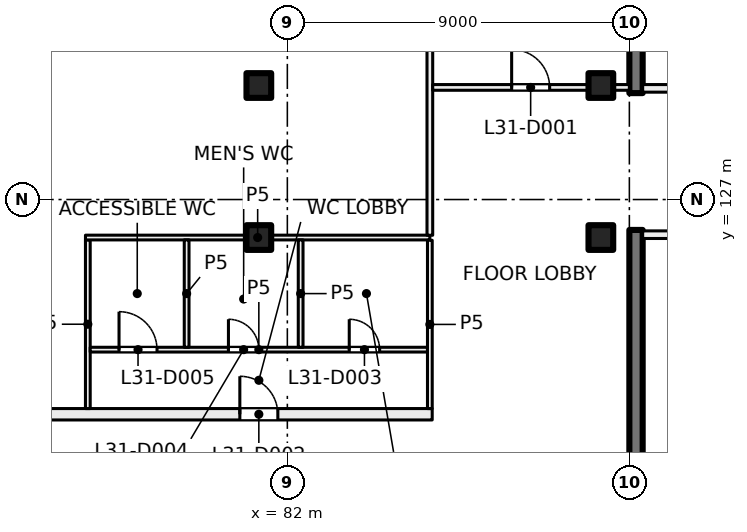
"""IFC4 building model, lengths in metres.
Left out: names, types, materials, properties, quantities, classifications, styles, units other than length and angle.
Written with IfcOpenShell. Run it as: python <this file> out.ifc"""

import sys

from ifc_helpers import new_model, si_unit, direction, frame, frame_2d, origin, origin_2d, place, context, subcontext, project, spatial, rectangle, extrude, element, fill, save


model = new_model("IFC4")
c1 = context("Model", 3, precision=1e-05, world=origin(), true_north=direction((0.0, 1.0)))
c2 = subcontext(c1, "Body", "Model", "MODEL_VIEW")
j1 = project(units=[si_unit("LENGTHUNIT", "METRE"), si_unit("PLANEANGLEUNIT", "RADIAN")], contexts=[c1])
p1 = place(None, origin())
s1 = spatial("IfcSite", under=j1, at=p1, CompositionType="ELEMENT")
p2 = place(p1, origin())
s2 = spatial("IfcBuilding", under=s1, at=p2, CompositionType="ELEMENT")
p3 = place(p2, frame((0.0, 0.0, 134.5)))
s3 = spatial("IfcBuildingStorey", under=s2, at=p3, CompositionType="ELEMENT", Elevation=134.5)
for number, where, z_axis, x_axis in (
    (1, (81.25, 130.0, 0.0), (0.0, 0.0, 1.0), (1.0, 0.0, 0.0)),
    (2, (90.25, 130.0, 0.0), (0.0, 0.0, 1.0), (1.0, 0.0, 0.0)),
    (3, (81.25, 126.0, 0.0), (0.0, 0.0, 1.0), (1.0, 0.0, 0.0)),
    (4, (90.25, 126.0, 0.0), (0.0, 0.0, 1.0), (1.0, 0.0, 0.0)),
):
    element("IfcColumn", number, at=place(p3, frame(where, z_axis=z_axis, x_axis=x_axis)), inside=s3, PredefinedType="COLUMN", context=c2, shape_type="SweptSolid", body=[
        extrude(rectangle(XDim=0.65, YDim=0.65, at=origin_2d()), origin(), (0.0, 0.0, 1.0), 4.0),
    ])
for number, where, z_axis, x_axis in (
    (5, (91.175, 138.45, 0.0), (0.0, 0.0, 1.0), (0.0, -1.0, 0.0)),
    (6, (91.175, 126.2, 0.0), (0.0, 0.0, 1.0), (0.0, -1.0, 0.0)),
):
    element("IfcWall", number, at=place(p3, frame(where, z_axis=z_axis, x_axis=x_axis)), inside=s3, PredefinedType="SHEAR", context=c2, shape_type="SweptSolid", body=[
        extrude(rectangle(XDim=8.65, YDim=0.35, at=frame_2d((4.325, 0.0))), origin(), (0.0, 0.0, 1.0), 4.0),
    ])
p4 = place(p3, frame((95.225, 126.075, 0.0), z_axis=(0.0, 0.0, 1.0), x_axis=(-1.0, 0.0, 0.0)))
e7 = element("IfcWall", 7, at=p4, inside=s3, PredefinedType="PARTITIONING", context=c2, shape_type="SweptSolid", body=[
    extrude(rectangle(XDim=3.875, YDim=0.2, at=frame_2d((1.938, 0.0))), origin(), (0.0, 0.0, 1.0), 3.625),
])
p5 = place(p4, frame((0.3, 0.0, 0.0)))
e8 = element("IfcOpeningElement", 8, at=p5, cuts=e7, PredefinedType="OPENING", context=c2, shape_type="SweptSolid", body=[
    extrude(rectangle(XDim=1.2, YDim=2.1, at=frame_2d((0.6, 1.05))), frame((0.0, 0.11, 0.0), z_axis=(0.0, -1.0, 0.0), x_axis=(1.0, 0.0, 0.0)), (0.0, 0.0, 1.0), 0.22),
])
p6 = place(p3, frame((91.35, 129.925, 0.0), z_axis=(0.0, 0.0, 1.0), x_axis=(1.0, 0.0, 0.0)))
e9 = element("IfcWall", 9, at=p6, inside=s3, PredefinedType="PARTITIONING", context=c2, shape_type="SweptSolid", body=[
    extrude(rectangle(XDim=3.875, YDim=0.2, at=frame_2d((1.938, 0.0))), origin(), (0.0, 0.0, 1.0), 3.625),
])
p7 = place(p6, frame((2.375, 0.0, 0.0)))
e10 = element("IfcOpeningElement", 10, at=p7, cuts=e9, PredefinedType="OPENING", context=c2, shape_type="SweptSolid", body=[
    extrude(rectangle(XDim=1.2, YDim=2.1, at=frame_2d((0.6, 1.05))), frame((0.0, 0.11, 0.0), z_axis=(0.0, -1.0, 0.0), x_axis=(1.0, 0.0, 0.0)), (0.0, 0.0, 1.0), 0.22),
])
p8 = place(p3, frame((50.506, 121.35, 0.0), z_axis=(0.0, 0.0, 1.0), x_axis=(1.0, 0.0, 0.0)))
e11 = element("IfcWall", 11, at=p8, inside=s3, PredefinedType="PARTITIONING", context=c2, shape_type="SweptSolid", body=[
    extrude(rectangle(XDim=35.306, YDim=0.3, at=frame_2d((17.653, 0.0))), origin(), (0.0, 0.0, 1.0), 3.625),
])
p9 = place(p8, frame((30.244, 0.0, 0.0)))
e12 = element("IfcOpeningElement", 12, at=p9, cuts=e11, PredefinedType="OPENING", context=c2, shape_type="SweptSolid", body=[
    extrude(rectangle(XDim=1.0, YDim=2.1, at=frame_2d((0.5, 1.05))), frame((0.0, 0.16, 0.0), z_axis=(0.0, -1.0, 0.0), x_axis=(1.0, 0.0, 0.0)), (0.0, 0.0, 1.0), 0.32),
])
p10 = place(p8, frame((14.094, 0.0, 0.0)))
e13 = element("IfcOpeningElement", 13, at=p10, cuts=e11, PredefinedType="OPENING", context=c2, shape_type="SweptSolid", body=[
    extrude(rectangle(XDim=1.8, YDim=2.1, at=frame_2d((0.9, 1.05))), frame((0.0, 0.16, 0.0), z_axis=(0.0, -1.0, 0.0), x_axis=(1.0, 0.0, 0.0)), (0.0, 0.0, 1.0), 0.32),
])
p11 = place(p8, frame((1.047, 0.0, 0.0)))
e14 = element("IfcOpeningElement", 14, at=p11, cuts=e11, PredefinedType="OPENING", context=c2, shape_type="SweptSolid", body=[
    extrude(rectangle(XDim=1.8, YDim=2.1, at=frame_2d((0.9, 1.05))), frame((0.0, 0.16, 0.0), z_axis=(0.0, -1.0, 0.0), x_axis=(1.0, 0.0, 0.0)), (0.0, 0.0, 1.0), 0.32),
])
p12 = place(p3, frame((76.75, 121.5, 0.0), z_axis=(0.0, 0.0, 1.0), x_axis=(0.0, 1.0, 0.0)))
e15 = element("IfcWall", 15, at=p12, inside=s3, PredefinedType="PARTITIONING", context=c2, shape_type="SweptSolid", body=[
    extrude(rectangle(XDim=4.438, YDim=0.125, at=frame_2d((2.219, 0.0))), origin(), (0.0, 0.0, 1.0), 3.625),
])
p13 = place(p3, frame((76.812, 123.05, 0.0), z_axis=(0.0, 0.0, 1.0), x_axis=(1.0, 0.0, 0.0)))
e16 = element("IfcWall", 16, at=p13, inside=s3, PredefinedType="PARTITIONING", context=c2, shape_type="SweptSolid", body=[
    extrude(rectangle(XDim=8.876, YDim=0.125, at=frame_2d((4.438, 0.0))), origin(), (0.0, 0.0, 1.0), 3.625),
])
p14 = place(p13, frame((6.817, 0.0, 0.0)))
e17 = element("IfcOpeningElement", 17, at=p14, cuts=e16, PredefinedType="OPENING", context=c2, shape_type="SweptSolid", body=[
    extrude(rectangle(XDim=0.8, YDim=2.1, at=frame_2d((0.4, 1.05))), frame((0.0, 0.073, 0.0), z_axis=(0.0, -1.0, 0.0), x_axis=(1.0, 0.0, 0.0)), (0.0, 0.0, 1.0), 0.145),
])
p15 = place(p13, frame((3.638, 0.0, 0.0)))
e18 = element("IfcOpeningElement", 18, at=p15, cuts=e16, PredefinedType="OPENING", context=c2, shape_type="SweptSolid", body=[
    extrude(rectangle(XDim=0.8, YDim=2.1, at=frame_2d((0.4, 1.05))), frame((0.0, 0.073, 0.0), z_axis=(0.0, -1.0, 0.0), x_axis=(1.0, 0.0, 0.0)), (0.0, 0.0, 1.0), 0.145),
])
p16 = place(p13, frame((0.759, 0.0, 0.0)))
e19 = element("IfcOpeningElement", 19, at=p16, cuts=e16, PredefinedType="OPENING", context=c2, shape_type="SweptSolid", body=[
    extrude(rectangle(XDim=1.0, YDim=2.1, at=frame_2d((0.5, 1.05))), frame((0.0, 0.073, 0.0), z_axis=(0.0, -1.0, 0.0), x_axis=(1.0, 0.0, 0.0)), (0.0, 0.0, 1.0), 0.145),
])
p17 = place(p3, frame((76.688, 126.0, 0.0), z_axis=(0.0, 0.0, 1.0), x_axis=(1.0, 0.0, 0.0)))
e20 = element("IfcWall", 20, at=p17, inside=s3, PredefinedType="PARTITIONING", context=c2, shape_type="SweptSolid", body=[
    extrude(rectangle(XDim=9.062, YDim=0.125, at=frame_2d((4.531, 0.0))), origin(), (0.0, 0.0, 1.0), 3.625),
])
for number, where, z_axis, x_axis in (
    (21, (79.35, 125.938, 0.0), (0.0, 0.0, 1.0), (0.0, -1.0, 0.0)),
    (22, (82.35, 125.938, 0.0), (0.0, 0.0, 1.0), (0.0, -1.0, 0.0)),
):
    element("IfcWall", number, at=place(p3, frame(where, z_axis=z_axis, x_axis=x_axis)), inside=s3, PredefinedType="PARTITIONING", context=c2, shape_type="SweptSolid", body=[
        extrude(rectangle(XDim=2.826, YDim=0.125, at=frame_2d((1.413, 0.0))), origin(), (0.0, 0.0, 1.0), 3.625),
    ])
p18 = place(p3, frame((85.75, 121.5, 0.0), z_axis=(0.0, 0.0, 1.0), x_axis=(0.0, 1.0, 0.0)))
e23 = element("IfcWall", 23, at=p18, inside=s3, PredefinedType="PARTITIONING", context=c2, shape_type="SweptSolid", body=[
    extrude(rectangle(XDim=4.428, YDim=0.125, at=frame_2d((2.214, 0.0))), origin(), (0.0, 0.0, 1.0), 3.625),
])
p19 = place(p3, frame((85.75, 126.06, 0.0), z_axis=(0.0, 0.0, 1.0), x_axis=(0.0, 1.0, 0.0)))
e24 = element("IfcWall", 24, at=p19, inside=s3, PredefinedType="PARTITIONING", context=c2, shape_type="SweptSolid", body=[
    extrude(rectangle(XDim=12.34, YDim=0.15, at=frame_2d((6.17, 0.0))), origin(), (0.0, 0.0, 1.0), 3.625),
])
p20 = place(p3, frame((85.825, 129.95, 0.0), z_axis=(0.0, 0.0, 1.0), x_axis=(1.0, 0.0, 0.0)))
e25 = element("IfcWall", 25, at=p20, inside=s3, PredefinedType="PARTITIONING", context=c2, shape_type="SweptSolid", body=[
    extrude(rectangle(XDim=5.175, YDim=0.15, at=frame_2d((2.587, 0.0))), origin(), (0.0, 0.0, 1.0), 3.625),
])
p21 = place(p20, frame((2.077, 0.0, 0.0)))
e26 = element("IfcOpeningElement", 26, at=p21, cuts=e25, PredefinedType="OPENING", context=c2, shape_type="SweptSolid", body=[
    extrude(rectangle(XDim=1.0, YDim=2.1, at=frame_2d((0.5, 1.05))), frame((0.0, 0.085, 0.0), z_axis=(0.0, -1.0, 0.0), x_axis=(1.0, 0.0, 0.0)), (0.0, 0.0, 1.0), 0.17),
])
p22 = place(p21, origin())
e27 = element("IfcDoor", 27, at=p22, inside=s3, OperationType="SINGLE_SWING_LEFT", PredefinedType="DOOR", context=c2, shape_type="SweptSolid", body=[
    extrude(rectangle(XDim=1.0, YDim=2.1, at=frame_2d((0.5, 1.05))), frame((0.0, 0.025, 0.0), z_axis=(0.0, -1.0, 0.0), x_axis=(1.0, 0.0, 0.0)), (0.0, 0.0, 1.0), 0.05),
])
fill(e26, e27)
p23 = place(p9, origin())
e28 = element("IfcDoor", 28, at=p23, inside=s3, OperationType="SINGLE_SWING_LEFT", PredefinedType="DOOR", context=c2, shape_type="SweptSolid", body=[
    extrude(rectangle(XDim=1.0, YDim=2.1, at=frame_2d((0.5, 1.05))), frame((0.0, 0.025, 0.0), z_axis=(0.0, -1.0, 0.0), x_axis=(1.0, 0.0, 0.0)), (0.0, 0.0, 1.0), 0.05),
])
fill(e12, e28)
p24 = place(p14, origin())
e29 = element("IfcDoor", 29, at=p24, inside=s3, OperationType="SINGLE_SWING_RIGHT", PredefinedType="DOOR", context=c2, shape_type="SweptSolid", body=[
    extrude(rectangle(XDim=0.8, YDim=2.1, at=frame_2d((0.4, 1.05))), frame((0.0, 0.025, 0.0), z_axis=(0.0, -1.0, 0.0), x_axis=(1.0, 0.0, 0.0)), (0.0, 0.0, 1.0), 0.05),
])
fill(e17, e29)
p25 = place(p15, origin())
e30 = element("IfcDoor", 30, at=p25, inside=s3, OperationType="SINGLE_SWING_LEFT", PredefinedType="DOOR", context=c2, shape_type="SweptSolid", body=[
    extrude(rectangle(XDim=0.8, YDim=2.1, at=frame_2d((0.4, 1.05))), frame((0.0, 0.025, 0.0), z_axis=(0.0, -1.0, 0.0), x_axis=(1.0, 0.0, 0.0)), (0.0, 0.0, 1.0), 0.05),
])
fill(e18, e30)
p26 = place(p16, origin())
e31 = element("IfcDoor", 31, at=p26, inside=s3, OperationType="SINGLE_SWING_LEFT", PredefinedType="DOOR", context=c2, shape_type="SweptSolid", body=[
    extrude(rectangle(XDim=1.0, YDim=2.1, at=frame_2d((0.5, 1.05))), frame((0.0, 0.025, 0.0), z_axis=(0.0, -1.0, 0.0), x_axis=(1.0, 0.0, 0.0)), (0.0, 0.0, 1.0), 0.05),
])
fill(e19, e31)
save(model, sys.argv[1])
